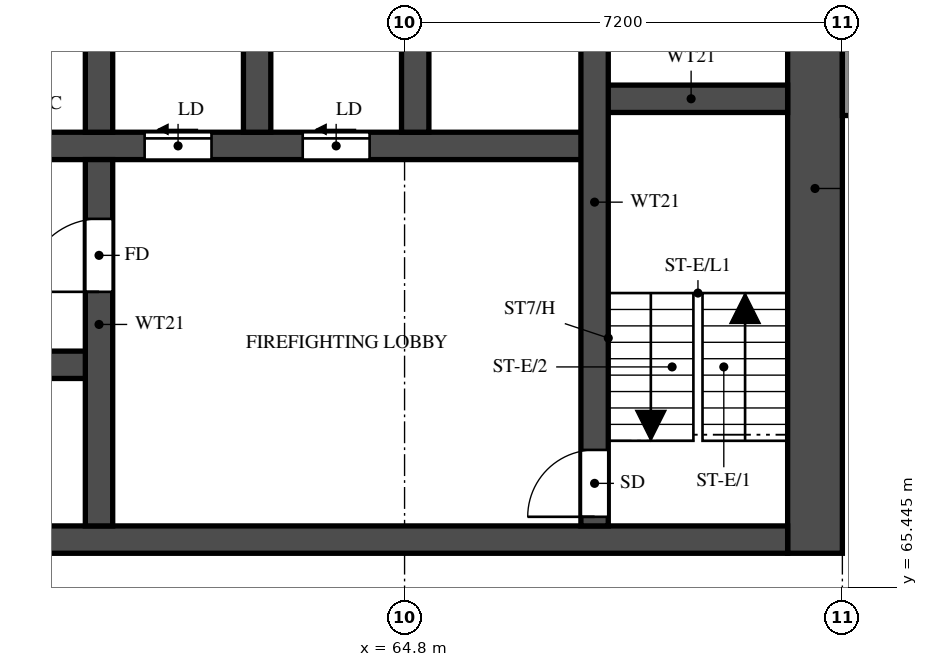
"""IFC4 building model, lengths in metres.
Left out: names, types, materials, properties, quantities, classifications, styles, units other than length and angle.
Written with IfcOpenShell. Run it as: python <this file> out.ifc"""

import sys

from ifc_helpers import new_model, si_unit, direction, frame, frame_2d, origin, place, context, subcontext, project, spatial, rectangle, extrude, element, fill, save


model = new_model("IFC4")
c1 = context("Model", 3, precision=1e-05, world=origin(), true_north=direction((0.0, 1.0)))
c2 = subcontext(c1, "Body", "Model", "MODEL_VIEW")
j1 = project(units=[si_unit("LENGTHUNIT", "METRE"), si_unit("PLANEANGLEUNIT", "RADIAN")], contexts=[c1])
p1 = place(None, origin())
s1 = spatial("IfcSite", under=j1, at=p1, CompositionType="ELEMENT")
p2 = place(p1, origin())
s2 = spatial("IfcBuilding", under=s1, at=p2, CompositionType="ELEMENT")
p3 = place(p2, frame((0.0, 0.0, 48.0)))
s3 = spatial("IfcBuildingStorey", under=s2, at=p3, CompositionType="ELEMENT", Elevation=48.0)
p4 = place(p3, frame((71.55, 66.0, 0.0), z_axis=(0.0, 0.0, 1.0), x_axis=(0.0, 1.0, 0.0)))
e1 = element("IfcWall", 1, at=p4, inside=s3, PredefinedType="SHEAR", context=c2, shape_type="SweptSolid", body=[
    extrude(rectangle(XDim=12.0, YDim=0.9, at=frame_2d((6.0, 0.0))), origin(), (0.0, 0.0, 1.0), 3.18),
])
p5 = place(p3, frame((29.7, 66.225, 0.0), z_axis=(0.0, 0.0, 1.0), x_axis=(1.0, 0.0, 0.0)))
e2 = element("IfcWall", 2, at=p5, inside=s3, PredefinedType="SHEAR", context=c2, shape_type="SweptSolid", body=[
    extrude(rectangle(XDim=41.4, YDim=0.45, at=frame_2d((20.7, 0.0))), origin(), (0.0, 0.0, 1.0), 3.18),
])
p6 = place(p5, frame((0.925, 0.0, 0.0)))
e3 = element("IfcOpeningElement", 3, at=p6, cuts=e2, PredefinedType="OPENING", context=c2, shape_type="SweptSolid", body=[
    extrude(rectangle(XDim=1.1, YDim=2.1, at=frame_2d((0.55, 1.05))), frame((0.0, 0.235, 0.0), z_axis=(0.0, -1.0, 0.0), x_axis=(1.0, 0.0, 0.0)), (0.0, 0.0, 1.0), 0.47),
])
p7 = place(p5, frame((3.738, 0.0, 0.0)))
e4 = element("IfcOpeningElement", 4, at=p7, cuts=e2, PredefinedType="OPENING", context=c2, shape_type="SweptSolid", body=[
    extrude(rectangle(XDim=1.8, YDim=2.1, at=frame_2d((0.9, 1.05))), frame((0.0, 0.235, 0.0), z_axis=(0.0, -1.0, 0.0), x_axis=(1.0, 0.0, 0.0)), (0.0, 0.0, 1.0), 0.47),
])
p8 = place(p3, frame((35.575, 69.1, 0.0), z_axis=(0.0, 0.0, 1.0), x_axis=(1.0, 0.0, 0.0)))
e5 = element("IfcWall", 5, at=p8, inside=s3, PredefinedType="SHEAR", context=c2, shape_type="SweptSolid", body=[
    extrude(rectangle(XDim=24.2, YDim=0.45, at=frame_2d((12.1, 0.0))), origin(), (0.0, 0.0, 1.0), 3.18),
])
p9 = place(p8, frame((1.05, 0.0, 0.0)))
e6 = element("IfcOpeningElement", 6, at=p9, cuts=e5, PredefinedType="OPENING", context=c2, shape_type="SweptSolid", body=[
    extrude(rectangle(XDim=1.1, YDim=2.1, at=frame_2d((0.55, 1.05))), frame((0.0, 0.235, 0.0), z_axis=(0.0, -1.0, 0.0), x_axis=(1.0, 0.0, 0.0)), (0.0, 0.0, 1.0), 0.47),
])
p10 = place(p8, frame((3.8, 0.0, 0.0)))
e7 = element("IfcOpeningElement", 7, at=p10, cuts=e5, PredefinedType="OPENING", context=c2, shape_type="SweptSolid", body=[
    extrude(rectangle(XDim=1.1, YDim=2.1, at=frame_2d((0.55, 1.05))), frame((0.0, 0.235, 0.0), z_axis=(0.0, -1.0, 0.0), x_axis=(1.0, 0.0, 0.0)), (0.0, 0.0, 1.0), 0.47),
])
p11 = place(p8, frame((6.55, 0.0, 0.0)))
e8 = element("IfcOpeningElement", 8, at=p11, cuts=e5, PredefinedType="OPENING", context=c2, shape_type="SweptSolid", body=[
    extrude(rectangle(XDim=1.1, YDim=2.1, at=frame_2d((0.55, 1.05))), frame((0.0, 0.235, 0.0), z_axis=(0.0, -1.0, 0.0), x_axis=(1.0, 0.0, 0.0)), (0.0, 0.0, 1.0), 0.47),
])
p12 = place(p8, frame((9.3, 0.0, 0.0)))
e9 = element("IfcOpeningElement", 9, at=p12, cuts=e5, PredefinedType="OPENING", context=c2, shape_type="SweptSolid", body=[
    extrude(rectangle(XDim=1.1, YDim=2.1, at=frame_2d((0.55, 1.05))), frame((0.0, 0.235, 0.0), z_axis=(0.0, -1.0, 0.0), x_axis=(1.0, 0.0, 0.0)), (0.0, 0.0, 1.0), 0.47),
])
p13 = place(p8, frame((12.05, 0.0, 0.0)))
e10 = element("IfcOpeningElement", 10, at=p13, cuts=e5, PredefinedType="OPENING", context=c2, shape_type="SweptSolid", body=[
    extrude(rectangle(XDim=1.1, YDim=2.1, at=frame_2d((0.55, 1.05))), frame((0.0, 0.235, 0.0), z_axis=(0.0, -1.0, 0.0), x_axis=(1.0, 0.0, 0.0)), (0.0, 0.0, 1.0), 0.47),
])
p14 = place(p8, frame((14.8, 0.0, 0.0)))
e11 = element("IfcOpeningElement", 11, at=p14, cuts=e5, PredefinedType="OPENING", context=c2, shape_type="SweptSolid", body=[
    extrude(rectangle(XDim=1.1, YDim=2.1, at=frame_2d((0.55, 1.05))), frame((0.0, 0.235, 0.0), z_axis=(0.0, -1.0, 0.0), x_axis=(1.0, 0.0, 0.0)), (0.0, 0.0, 1.0), 0.47),
])
p15 = place(p3, frame((32.875, 72.7, 0.0), z_axis=(0.0, 0.0, 1.0), x_axis=(1.0, 0.0, 0.0)))
e12 = element("IfcWall", 12, at=p15, inside=s3, PredefinedType="SHEAR", context=c2, shape_type="SweptSolid", body=[
    extrude(rectangle(XDim=35.05, YDim=0.45, at=frame_2d((17.525, 0.0))), origin(), (0.0, 0.0, 1.0), 3.18),
])
p16 = place(p15, frame((19.8, 0.0, 0.0)))
e13 = element("IfcOpeningElement", 13, at=p16, cuts=e12, PredefinedType="OPENING", context=c2, shape_type="SweptSolid", body=[
    extrude(rectangle(XDim=1.1, YDim=2.1, at=frame_2d((0.55, 1.05))), frame((0.0, 0.235, 0.0), z_axis=(0.0, -1.0, 0.0), x_axis=(1.0, 0.0, 0.0)), (0.0, 0.0, 1.0), 0.47),
])
p17 = place(p15, frame((27.65, 0.0, 0.0)))
e14 = element("IfcOpeningElement", 14, at=p17, cuts=e12, PredefinedType="OPENING", context=c2, shape_type="SweptSolid", body=[
    extrude(rectangle(XDim=1.1, YDim=2.1, at=frame_2d((0.55, 1.05))), frame((0.0, 0.235, 0.0), z_axis=(0.0, -1.0, 0.0), x_axis=(1.0, 0.0, 0.0)), (0.0, 0.0, 1.0), 0.47),
])
p18 = place(p15, frame((30.25, 0.0, 0.0)))
e15 = element("IfcOpeningElement", 15, at=p18, cuts=e12, PredefinedType="OPENING", context=c2, shape_type="SweptSolid", body=[
    extrude(rectangle(XDim=1.1, YDim=2.1, at=frame_2d((0.55, 1.05))), frame((0.0, 0.235, 0.0), z_axis=(0.0, -1.0, 0.0), x_axis=(1.0, 0.0, 0.0)), (0.0, 0.0, 1.0), 0.47),
])
p19 = place(p15, frame((3.75, 0.0, 0.0)))
e16 = element("IfcOpeningElement", 16, at=p19, cuts=e12, PredefinedType="OPENING", context=c2, shape_type="SweptSolid", body=[
    extrude(rectangle(XDim=1.1, YDim=2.1, at=frame_2d((0.55, 1.05))), frame((0.0, 0.235, 0.0), z_axis=(0.0, -1.0, 0.0), x_axis=(1.0, 0.0, 0.0)), (0.0, 0.0, 1.0), 0.47),
])
p20 = place(p15, frame((6.5, 0.0, 0.0)))
e17 = element("IfcOpeningElement", 17, at=p20, cuts=e12, PredefinedType="OPENING", context=c2, shape_type="SweptSolid", body=[
    extrude(rectangle(XDim=1.1, YDim=2.1, at=frame_2d((0.55, 1.05))), frame((0.0, 0.235, 0.0), z_axis=(0.0, -1.0, 0.0), x_axis=(1.0, 0.0, 0.0)), (0.0, 0.0, 1.0), 0.47),
])
p21 = place(p15, frame((9.25, 0.0, 0.0)))
e18 = element("IfcOpeningElement", 18, at=p21, cuts=e12, PredefinedType="OPENING", context=c2, shape_type="SweptSolid", body=[
    extrude(rectangle(XDim=1.1, YDim=2.1, at=frame_2d((0.55, 1.05))), frame((0.0, 0.235, 0.0), z_axis=(0.0, -1.0, 0.0), x_axis=(1.0, 0.0, 0.0)), (0.0, 0.0, 1.0), 0.47),
])
p22 = place(p15, frame((12.0, 0.0, 0.0)))
e19 = element("IfcOpeningElement", 19, at=p22, cuts=e12, PredefinedType="OPENING", context=c2, shape_type="SweptSolid", body=[
    extrude(rectangle(XDim=1.1, YDim=2.1, at=frame_2d((0.55, 1.05))), frame((0.0, 0.235, 0.0), z_axis=(0.0, -1.0, 0.0), x_axis=(1.0, 0.0, 0.0)), (0.0, 0.0, 1.0), 0.47),
])
p23 = place(p15, frame((14.75, 0.0, 0.0)))
e20 = element("IfcOpeningElement", 20, at=p23, cuts=e12, PredefinedType="OPENING", context=c2, shape_type="SweptSolid", body=[
    extrude(rectangle(XDim=1.1, YDim=2.1, at=frame_2d((0.55, 1.05))), frame((0.0, 0.235, 0.0), z_axis=(0.0, -1.0, 0.0), x_axis=(1.0, 0.0, 0.0)), (0.0, 0.0, 1.0), 0.47),
])
p24 = place(p15, frame((17.5, 0.0, 0.0)))
e21 = element("IfcOpeningElement", 21, at=p24, cuts=e12, PredefinedType="OPENING", context=c2, shape_type="SweptSolid", body=[
    extrude(rectangle(XDim=1.1, YDim=2.1, at=frame_2d((0.55, 1.05))), frame((0.0, 0.235, 0.0), z_axis=(0.0, -1.0, 0.0), x_axis=(1.0, 0.0, 0.0)), (0.0, 0.0, 1.0), 0.47),
])
p25 = place(p15, frame((0.913, 0.0, 0.0)))
e22 = element("IfcOpeningElement", 22, at=p25, cuts=e12, PredefinedType="OPENING", context=c2, shape_type="SweptSolid", body=[
    extrude(rectangle(XDim=1.1, YDim=2.1, at=frame_2d((0.55, 1.05))), frame((0.0, 0.235, 0.0), z_axis=(0.0, -1.0, 0.0), x_axis=(1.0, 0.0, 0.0)), (0.0, 0.0, 1.0), 0.47),
])
p26 = place(p3, frame((67.925, 73.475, 0.0), z_axis=(0.0, 0.0, 1.0), x_axis=(1.0, 0.0, 0.0)))
e23 = element("IfcWall", 23, at=p26, inside=s3, PredefinedType="SHEAR", context=c2, shape_type="SweptSolid", body=[
    extrude(rectangle(XDim=3.175, YDim=0.45, at=frame_2d((1.587, 0.0))), origin(), (0.0, 0.0, 1.0), 3.18),
])
p27 = place(p3, frame((67.925, 66.45, 0.0), z_axis=(0.0, 0.0, 1.0), x_axis=(0.0, 1.0, 0.0)))
e24 = element("IfcWall", 24, at=p27, inside=s3, PredefinedType="SHEAR", context=c2, shape_type="SweptSolid", body=[
    extrude(rectangle(XDim=10.65, YDim=0.45, at=frame_2d((5.325, 0.0))), origin(), (0.0, 0.0, 1.0), 3.18),
])
p28 = place(p27, frame((0.15, 0.0, 0.0)))
e25 = element("IfcOpeningElement", 25, at=p28, cuts=e24, PredefinedType="OPENING", context=c2, shape_type="SweptSolid", body=[
    extrude(rectangle(XDim=1.1, YDim=2.1, at=frame_2d((0.55, 1.05))), frame((0.0, 0.235, 0.0), z_axis=(0.0, -1.0, 0.0), x_axis=(1.0, 0.0, 0.0)), (0.0, 0.0, 1.0), 0.47),
])
p29 = place(p3, frame((59.775, 66.45, 0.0), z_axis=(0.0, 0.0, 1.0), x_axis=(0.0, 1.0, 0.0)))
e26 = element("IfcWall", 26, at=p29, inside=s3, PredefinedType="SHEAR", context=c2, shape_type="SweptSolid", body=[
    extrude(rectangle(XDim=6.025, YDim=0.45, at=frame_2d((3.013, 0.0))), origin(), (0.0, 0.0, 1.0), 3.18),
])
p30 = place(p29, frame((3.85, 0.0, 0.0)))
e27 = element("IfcOpeningElement", 27, at=p30, cuts=e26, PredefinedType="OPENING", context=c2, shape_type="SweptSolid", body=[
    extrude(rectangle(XDim=1.2, YDim=2.1, at=frame_2d((0.6, 1.05))), frame((0.0, 0.235, 0.0), z_axis=(0.0, -1.0, 0.0), x_axis=(1.0, 0.0, 0.0)), (0.0, 0.0, 1.0), 0.47),
])
for number, where, z_axis, x_axis in (
    (28, (59.775, 72.925, 0.0), (0.0, 0.0, 1.0), (0.0, 1.0, 0.0)),
    (29, (62.375, 72.925, 0.0), (0.0, 0.0, 1.0), (0.0, 1.0, 0.0)),
    (30, (64.975, 72.925, 0.0), (0.0, 0.0, 1.0), (0.0, 1.0, 0.0)),
):
    element("IfcWall", number, at=place(p3, frame(where, z_axis=z_axis, x_axis=x_axis)), inside=s3, PredefinedType="SHEAR", context=c2, shape_type="SweptSolid", body=[
        extrude(rectangle(XDim=2.95, YDim=0.45, at=frame_2d((1.475, 0.0))), origin(), (0.0, 0.0, 1.0), 3.18),
    ])
p31 = place(p3, frame((72.1, 73.2, 0.0), z_axis=(0.0, 0.0, 1.0), x_axis=(0.0, 1.0, 0.0)))
e31 = element("IfcWall", 31, at=p31, inside=s3, PredefinedType="SOLIDWALL", context=c2, shape_type="SweptSolid", body=[
    extrude(rectangle(XDim=4.8, YDim=0.2, at=frame_2d((2.4, 0.0))), origin(), (0.0, 0.0, 1.0), 3.18),
])
p32 = place(p28, origin())
e32 = element("IfcDoor", 32, at=p32, inside=s3, OperationType="SINGLE_SWING_LEFT", PredefinedType="DOOR", context=c2, shape_type="SweptSolid", body=[
    extrude(rectangle(XDim=1.1, YDim=2.1, at=frame_2d((0.55, 1.05))), frame((0.0, 0.025, 0.0), z_axis=(0.0, -1.0, 0.0), x_axis=(1.0, 0.0, 0.0)), (0.0, 0.0, 1.0), 0.05),
])
fill(e25, e32)
p33 = place(p30, origin())
e33 = element("IfcDoor", 33, at=p33, inside=s3, OperationType="SINGLE_SWING_RIGHT", PredefinedType="DOOR", context=c2, shape_type="SweptSolid", body=[
    extrude(rectangle(XDim=1.2, YDim=2.1, at=frame_2d((0.6, 1.05))), frame((0.0, 0.025, 0.0), z_axis=(0.0, -1.0, 0.0), x_axis=(1.0, 0.0, 0.0)), (0.0, 0.0, 1.0), 0.05),
])
fill(e27, e33)
p34 = place(p17, origin())
e34 = element("IfcDoor", 34, at=p34, inside=s3, OperationType="SLIDING_TO_LEFT", PredefinedType="DOOR", context=c2, shape_type="SweptSolid", body=[
    extrude(rectangle(XDim=1.1, YDim=2.1, at=frame_2d((0.55, 1.05))), frame((0.0, 0.025, 0.0), z_axis=(0.0, -1.0, 0.0), x_axis=(1.0, 0.0, 0.0)), (0.0, 0.0, 1.0), 0.05),
])
fill(e14, e34)
p35 = place(p18, origin())
e35 = element("IfcDoor", 35, at=p35, inside=s3, OperationType="SLIDING_TO_LEFT", PredefinedType="DOOR", context=c2, shape_type="SweptSolid", body=[
    extrude(rectangle(XDim=1.1, YDim=2.1, at=frame_2d((0.55, 1.05))), frame((0.0, 0.025, 0.0), z_axis=(0.0, -1.0, 0.0), x_axis=(1.0, 0.0, 0.0)), (0.0, 0.0, 1.0), 0.05),
])
fill(e15, e35)
save(model, sys.argv[1])
